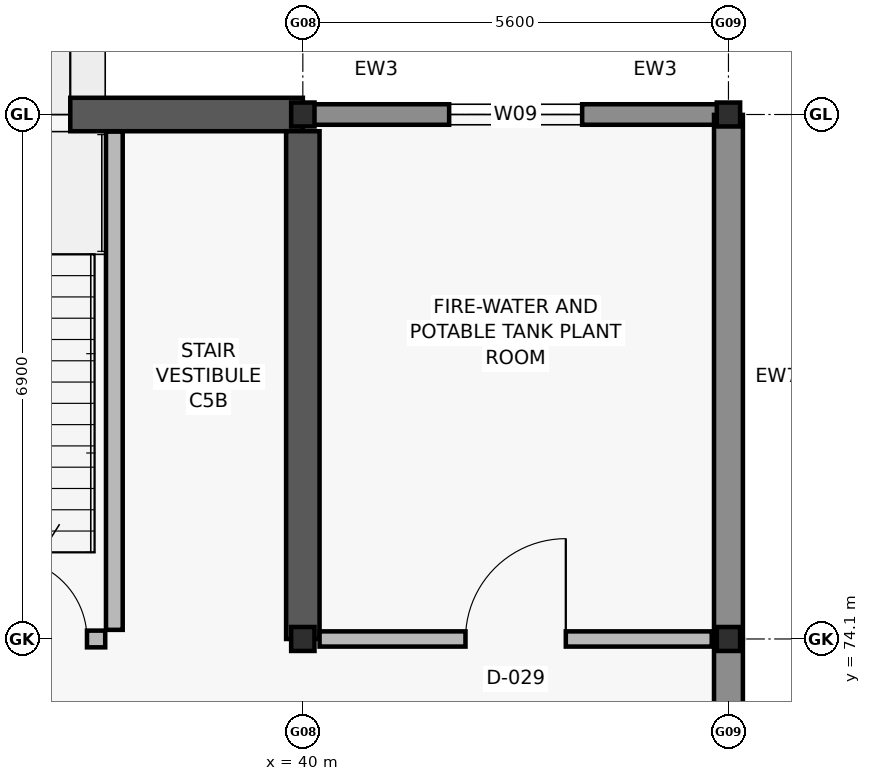
"""IFC4 building model, lengths in metres.
Left out: names, types, materials, properties, quantities, classifications, styles, units other than length and angle.
Written with IfcOpenShell. Run it as: python <this file> out.ifc"""

import sys

from ifc_helpers import new_model, si_unit, direction, frame, frame_2d, origin, origin_2d, place, context, subcontext, project, spatial, rectangle, i_section, extrude, element, fill, save


model = new_model("IFC4")
c1 = context("Model", 3, precision=1e-05, world=origin(), true_north=direction((0.0, 1.0)))
c2 = subcontext(c1, "Body", "Model", "MODEL_VIEW")
j1 = project(units=[si_unit("LENGTHUNIT", "METRE"), si_unit("PLANEANGLEUNIT", "RADIAN")], contexts=[c1])
p1 = place(None, origin())
s1 = spatial("IfcSite", under=j1, at=p1, CompositionType="ELEMENT")
p2 = place(p1, origin())
s2 = spatial("IfcBuilding", under=s1, at=p2, CompositionType="ELEMENT")
p3 = place(p2, origin())
s3 = spatial("IfcBuildingStorey", under=s2, at=p3, CompositionType="ELEMENT", Elevation=0.0)
for number, where, z_axis, x_axis in (
    (1, (40.0, 74.1, 0.0), (0.0, 0.0, 1.0), (1.0, 0.0, 0.0)),
    (2, (40.0, 81.0, 0.0), (0.0, 0.0, 1.0), (1.0, 0.0, 0.0)),
    (3, (45.6, 74.1, 0.0), (0.0, 0.0, 1.0), (1.0, 0.0, 0.0)),
    (4, (45.6, 81.0, 0.0), (0.0, 0.0, 1.0), (1.0, 0.0, 0.0)),
):
    element("IfcColumn", number, at=place(p3, frame(where, z_axis=z_axis, x_axis=x_axis)), inside=s3, PredefinedType="COLUMN", context=c2, shape_type="SweptSolid", body=[
        extrude(i_section(OverallWidth=0.307, OverallDepth=0.315, WebThickness=0.012, FlangeThickness=0.019, FilletRadius=0.017, at=origin_2d()), origin(), (0.0, 0.0, 1.0), 5.4),
    ])
p4 = place(p3, frame((34.4, 81.0, 0.0), z_axis=(0.0, 0.0, 1.0), x_axis=(1.0, 0.0, 0.0)))
e5 = element("IfcWall", 5, at=p4, inside=s3, PredefinedType="SHEAR", context=c2, shape_type="SweptSolid", body=[
    extrude(rectangle(XDim=5.6, YDim=0.44, at=frame_2d((2.8, 0.0))), origin(), (0.0, 0.0, 1.0), 5.16),
])
p5 = place(p4, frame((1.48, 0.0, 0.0)))
e6 = element("IfcOpeningElement", 6, at=p5, cuts=e5, PredefinedType="OPENING", context=c2, shape_type="SweptSolid", body=[
    extrude(rectangle(XDim=1.06, YDim=2.12, at=frame_2d((0.53, 1.06))), frame((0.0, 0.23, 0.0), z_axis=(0.0, -1.0, 0.0), x_axis=(1.0, 0.0, 0.0)), (0.0, 0.0, 1.0), 0.46),
])
p6 = place(p3, frame((40.0, 74.1, 0.0), z_axis=(0.0, 0.0, 1.0), x_axis=(0.0, 1.0, 0.0)))
e7 = element("IfcWall", 7, at=p6, inside=s3, PredefinedType="SHEAR", context=c2, shape_type="SweptSolid", body=[
    extrude(rectangle(XDim=6.68, YDim=0.44, at=frame_2d((3.34, 0.0))), origin(), (0.0, 0.0, 1.0), 5.16),
])
p7 = place(p3, frame((40.005, 81.0, 0.0), z_axis=(0.0, 0.0, 1.0), x_axis=(1.0, 0.0, 0.0)))
e8 = element("IfcWall", 8, at=p7, inside=s3, PredefinedType="SOLIDWALL", context=c2, shape_type="SweptSolid", body=[
    extrude(rectangle(XDim=5.59, YDim=0.27, at=frame_2d((2.795, 0.0))), origin(), (0.0, 0.0, 1.0), 4.52),
])
p8 = place(p7, frame((1.92, 0.0, 0.8)))
e9 = element("IfcOpeningElement", 9, at=p8, cuts=e8, PredefinedType="OPENING", context=c2, shape_type="SweptSolid", body=[
    extrude(rectangle(XDim=1.75, YDim=1.8, at=frame_2d((0.875, 0.9))), frame((0.0, 0.145, 0.0), z_axis=(0.0, -1.0, 0.0), x_axis=(1.0, 0.0, 0.0)), (0.0, 0.0, 1.0), 0.29),
])
p9 = place(p3, frame((45.6, 74.095, 0.0), z_axis=(0.0, 0.0, 1.0), x_axis=(0.0, -1.0, 0.0)))
e10 = element("IfcWall", 10, at=p9, inside=s3, PredefinedType="SOLIDWALL", context=c2, shape_type="SweptSolid", body=[
    extrude(rectangle(XDim=6.89, YDim=0.38, at=frame_2d((3.445, 0.0))), origin(), (0.0, 0.0, 1.0), 4.52),
])
p10 = place(p3, frame((45.6, 80.995, 0.0), z_axis=(0.0, 0.0, 1.0), x_axis=(0.0, -1.0, 0.0)))
e11 = element("IfcWall", 11, at=p10, inside=s3, PredefinedType="SOLIDWALL", context=c2, shape_type="SweptSolid", body=[
    extrude(rectangle(XDim=6.89, YDim=0.38, at=frame_2d((3.445, 0.0))), origin(), (0.0, 0.0, 1.0), 4.52),
])
p11 = place(p3, frame((37.52, 74.22, 0.0), z_axis=(0.0, 0.0, 1.0), x_axis=(0.0, 1.0, 0.0)))
e12 = element("IfcWall", 12, at=p11, inside=s3, PredefinedType="SOLIDWALL", context=c2, shape_type="SweptSolid", body=[
    extrude(rectangle(XDim=6.555, YDim=0.22, at=frame_2d((3.277, 0.0))), origin(), (0.0, 0.0, 1.0), 5.16),
])
p12 = place(p3, frame((34.66, 74.1, 0.0), z_axis=(0.0, 0.0, 1.0), x_axis=(1.0, 0.0, 0.0)))
e13 = element("IfcWall", 13, at=p12, inside=s3, PredefinedType="SOLIDWALL", context=c2, shape_type="SweptSolid", body=[
    extrude(rectangle(XDim=2.74, YDim=0.22, at=frame_2d((1.37, 0.0))), origin(), (0.0, 0.0, 1.0), 4.52),
])
p13 = place(p12, frame((1.44, 0.0, 0.0)))
e14 = element("IfcOpeningElement", 14, at=p13, cuts=e13, PredefinedType="OPENING", context=c2, shape_type="SweptSolid", body=[
    extrude(rectangle(XDim=1.06, YDim=2.1, at=frame_2d((0.53, 1.05))), frame((0.0, 0.12, 0.0), z_axis=(0.0, -1.0, 0.0), x_axis=(1.0, 0.0, 0.0)), (0.0, 0.0, 1.0), 0.24),
])
p14 = place(p3, frame((40.22, 74.1, 0.0), z_axis=(0.0, 0.0, 1.0), x_axis=(1.0, 0.0, 0.0)))
e15 = element("IfcWall", 15, at=p14, inside=s3, PredefinedType="PARTITIONING", context=c2, shape_type="SweptSolid", body=[
    extrude(rectangle(XDim=5.16, YDim=0.2, at=frame_2d((2.58, 0.0))), origin(), (0.0, 0.0, 1.0), 4.5),
])
p15 = place(p14, frame((1.92, 0.0, 0.0)))
e16 = element("IfcOpeningElement", 16, at=p15, cuts=e15, PredefinedType="OPENING", context=c2, shape_type="SweptSolid", body=[
    extrude(rectangle(XDim=1.32, YDim=2.12, at=frame_2d((0.66, 1.06))), frame((0.0, 0.11, 0.0), z_axis=(0.0, -1.0, 0.0), x_axis=(1.0, 0.0, 0.0)), (0.0, 0.0, 1.0), 0.22),
])
p16 = place(p8, origin())
e17 = element("IfcWindow", 17, at=p16, inside=s3, PartitioningType="DOUBLE_PANEL_VERTICAL", PredefinedType="WINDOW", context=c2, shape_type="SweptSolid", body=[
    extrude(rectangle(XDim=1.75, YDim=1.8, at=frame_2d((0.875, 0.9))), frame((0.0, 0.03, 0.0), z_axis=(0.0, -1.0, 0.0), x_axis=(1.0, 0.0, 0.0)), (0.0, 0.0, 1.0), 0.06),
])
fill(e9, e17)
p17 = place(p13, origin())
e18 = element("IfcDoor", 18, at=p17, inside=s3, OperationType="SINGLE_SWING_LEFT", PredefinedType="DOOR", context=c2, shape_type="SweptSolid", body=[
    extrude(rectangle(XDim=1.06, YDim=2.1, at=frame_2d((0.53, 1.05))), frame((0.0, 0.025, 0.0), z_axis=(0.0, -1.0, 0.0), x_axis=(1.0, 0.0, 0.0)), (0.0, 0.0, 1.0), 0.05),
])
fill(e14, e18)
p18 = place(p5, origin())
e19 = element("IfcDoor", 19, at=p18, inside=s3, OperationType="SINGLE_SWING_RIGHT", PredefinedType="DOOR", context=c2, shape_type="SweptSolid", body=[
    extrude(rectangle(XDim=1.06, YDim=2.12, at=frame_2d((0.53, 1.06))), frame((0.0, 0.025, 0.0), z_axis=(0.0, -1.0, 0.0), x_axis=(1.0, 0.0, 0.0)), (0.0, 0.0, 1.0), 0.05),
])
fill(e6, e19)
p19 = place(p15, origin())
e20 = element("IfcDoor", 20, at=p19, inside=s3, OperationType="SINGLE_SWING_RIGHT", PredefinedType="DOOR", context=c2, shape_type="SweptSolid", body=[
    extrude(rectangle(XDim=1.32, YDim=2.12, at=frame_2d((0.66, 1.06))), frame((0.0, 0.025, 0.0), z_axis=(0.0, -1.0, 0.0), x_axis=(1.0, 0.0, 0.0)), (0.0, 0.0, 1.0), 0.05),
])
fill(e16, e20)
save(model, sys.argv[1])
